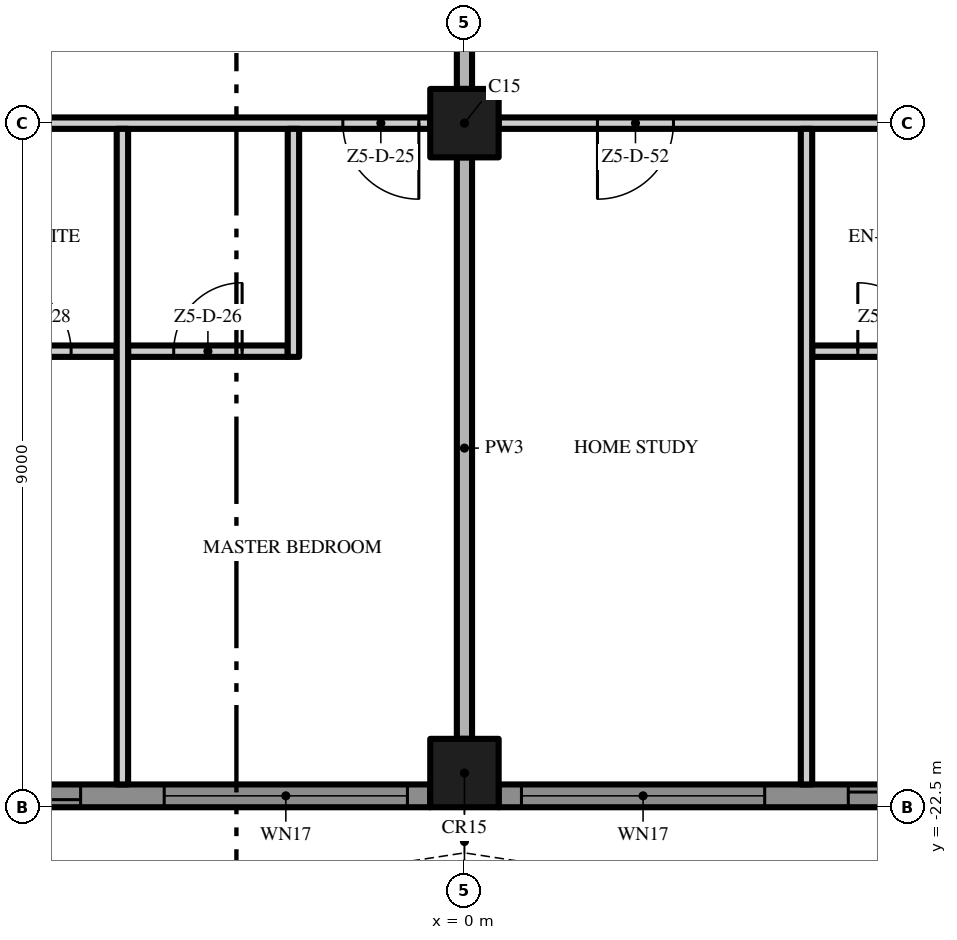
"""IFC4 building model, lengths in metres.
Left out: names, types, materials, properties, quantities, classifications, styles, units other than length and angle.
Written with IfcOpenShell. Run it as: python <this file> out.ifc"""

import sys

from ifc_helpers import new_model, si_unit, direction, frame, frame_2d, origin, origin_2d, place, context, subcontext, project, spatial, polyline, rectangle, outline, extrude, element, fill, save


model = new_model("IFC4")
c1 = context("Model", 3, precision=1e-05, world=origin(), true_north=direction((0.0, 1.0)))
c2 = subcontext(c1, "Body", "Model", "MODEL_VIEW")
j1 = project(units=[si_unit("LENGTHUNIT", "METRE"), si_unit("PLANEANGLEUNIT", "RADIAN")], contexts=[c1])
p1 = place(None, origin())
s1 = spatial("IfcSite", under=j1, at=p1, CompositionType="ELEMENT")
p2 = place(p1, origin())
s2 = spatial("IfcBuilding", under=s1, at=p2, CompositionType="ELEMENT")
p3 = place(p2, frame((0.0, 0.0, 280.6)))
s3 = spatial("IfcBuildingStorey", under=s2, at=p3, CompositionType="ELEMENT", Elevation=280.6)
for number, where, z_axis, x_axis in (
    (1, (0.0, -13.5, 0.0), (0.0, 0.0, 1.0), (1.0, 0.0, 0.0)),
    (2, (0.0, -22.05, 0.0), (0.0, 0.0, 1.0), (1.0, 0.0, 0.0)),
):
    element("IfcColumn", number, at=place(p3, frame(where, z_axis=z_axis, x_axis=x_axis)), inside=s3, PredefinedType="COLUMN", context=c2, shape_type="SweptSolid", body=[
        extrude(rectangle(XDim=0.9, YDim=0.9, at=origin_2d()), origin(), (0.0, 0.0, 1.0), 3.5),
    ])
p4 = place(p3, frame((-0.45, -22.35, 0.0), z_axis=(0.0, 0.0, 1.0), x_axis=(-1.0, 0.0, 0.0)))
e3 = element("IfcWall", 3, at=p4, inside=s3, PredefinedType="SOLIDWALL", context=c2, shape_type="SweptSolid", body=[
    extrude(rectangle(XDim=8.1, YDim=0.3, at=frame_2d((4.05, 0.0))), origin(), (0.0, 0.0, 1.0), 3.5),
])
p5 = place(p4, frame((4.6, 0.0, 0.0)))
e4 = element("IfcOpeningElement", 4, at=p5, cuts=e3, PredefinedType="OPENING", context=c2, shape_type="SweptSolid", body=[
    extrude(rectangle(XDim=3.2, YDim=2.4, at=frame_2d((1.6, 1.2))), frame((0.0, 0.16, 0.0), z_axis=(0.0, -1.0, 0.0), x_axis=(1.0, 0.0, 0.0)), (0.0, 0.0, 1.0), 0.32),
])
p6 = place(p4, frame((0.3, 0.0, 0.45)))
e5 = element("IfcOpeningElement", 5, at=p6, cuts=e3, PredefinedType="OPENING", context=c2, shape_type="SweptSolid", body=[
    extrude(rectangle(XDim=3.2, YDim=2.65, at=frame_2d((1.6, 1.325))), frame((0.0, 0.16, 0.0), z_axis=(0.0, -1.0, 0.0), x_axis=(1.0, 0.0, 0.0)), (0.0, 0.0, 1.0), 0.32),
])
p7 = place(p3, frame((8.55, -22.35, 0.0), z_axis=(0.0, 0.0, 1.0), x_axis=(-1.0, 0.0, 0.0)))
e6 = element("IfcWall", 6, at=p7, inside=s3, PredefinedType="SOLIDWALL", context=c2, shape_type="SweptSolid", body=[
    extrude(rectangle(XDim=8.1, YDim=0.3, at=frame_2d((4.05, 0.0))), origin(), (0.0, 0.0, 1.0), 3.5),
])
p8 = place(p7, frame((4.6, 0.0, 0.45)))
e7 = element("IfcOpeningElement", 7, at=p8, cuts=e6, PredefinedType="OPENING", context=c2, shape_type="SweptSolid", body=[
    extrude(rectangle(XDim=3.2, YDim=2.65, at=frame_2d((1.6, 1.325))), frame((0.0, 0.16, 0.0), z_axis=(0.0, -1.0, 0.0), x_axis=(1.0, 0.0, 0.0)), (0.0, 0.0, 1.0), 0.32),
])
p9 = place(p7, frame((0.3, 0.0, 0.0)))
e8 = element("IfcOpeningElement", 8, at=p9, cuts=e6, PredefinedType="OPENING", context=c2, shape_type="SweptSolid", body=[
    extrude(rectangle(XDim=3.2, YDim=2.4, at=frame_2d((1.6, 1.2))), frame((0.0, 0.16, 0.0), z_axis=(0.0, -1.0, 0.0), x_axis=(1.0, 0.0, 0.0)), (0.0, 0.0, 1.0), 0.32),
])
p10 = place(p3, origin())
e9 = element("IfcWall", 9, at=p10, inside=s3, PredefinedType="USERDEFINED", context=c2, shape_type="SweptSolid", body=[
    extrude(outline(polyline([(-22.5, -25.5), (-21.0, -25.271), (-19.5, -24.671), (-18.0, -23.929), (-16.5, -23.329), (-15.0, -23.1), (-13.5, -23.329), (-12.0, -23.929), (-10.5, -24.671), (-9.0, -25.271), (-7.5, -25.5), (-6.0, -25.271), (-4.5, -24.671), (-3.0, -23.929), (-1.5, -23.329), (0.0, -23.1), (1.5, -23.329), (3.0, -23.929), (4.5, -24.671), (6.0, -25.271), (7.5, -25.5), (9.0, -25.271), (10.5, -24.671), (12.0, -23.929), (13.5, -23.329), (15.0, -23.1), (16.5, -23.329), (18.0, -23.929), (19.5, -24.671), (21.0, -25.271), (22.5, -25.5), (22.538, -25.253), (21.066, -25.028), (19.602, -24.442), (18.102, -23.701), (16.566, -23.086), (15.0, -22.847), (13.434, -23.086), (11.898, -23.701), (10.398, -24.442), (8.934, -25.028), (7.5, -25.247), (6.066, -25.028), (4.602, -24.442), (3.102, -23.701), (1.566, -23.086), (0.0, -22.847), (-1.566, -23.086), (-3.102, -23.701), (-4.602, -24.442), (-6.066, -25.028), (-7.5, -25.247), (-8.934, -25.028), (-10.398, -24.442), (-11.898, -23.701), (-13.434, -23.086), (-15.0, -22.847), (-16.566, -23.086), (-18.102, -23.701), (-19.602, -24.442), (-21.066, -25.028), (-22.538, -25.253), (-22.5, -25.5)])), origin(), (0.0, 0.0, 1.0), 0.9),
])
p11 = place(p3, frame((-6.675, -16.5, 0.0), z_axis=(0.0, 0.0, 1.0), x_axis=(1.0, 0.0, 0.0)))
e10 = element("IfcWall", 10, at=p11, inside=s3, PredefinedType="PARTITIONING", context=c2, shape_type="SweptSolid", body=[
    extrude(rectangle(XDim=2.1, YDim=0.15, at=frame_2d((1.05, 0.0))), origin(), (0.0, 0.0, 1.0), 3.5),
])
p12 = place(p11, frame((0.6, 0.0, 0.0)))
e11 = element("IfcOpeningElement", 11, at=p12, cuts=e10, PredefinedType="OPENING", context=c2, shape_type="SweptSolid", body=[
    extrude(rectangle(XDim=0.9, YDim=2.1, at=frame_2d((0.45, 1.05))), frame((0.0, 0.085, 0.0), z_axis=(0.0, -1.0, 0.0), x_axis=(1.0, 0.0, 0.0)), (0.0, 0.0, 1.0), 0.17),
])
p13 = place(p3, frame((-4.425, -16.5, 0.0), z_axis=(0.0, 0.0, 1.0), x_axis=(1.0, 0.0, 0.0)))
e12 = element("IfcWall", 12, at=p13, inside=s3, PredefinedType="PARTITIONING", context=c2, shape_type="SweptSolid", body=[
    extrude(rectangle(XDim=2.1, YDim=0.15, at=frame_2d((1.05, 0.0))), origin(), (0.0, 0.0, 1.0), 3.5),
])
p14 = place(p13, frame((0.6, 0.0, 0.0)))
e13 = element("IfcOpeningElement", 13, at=p14, cuts=e12, PredefinedType="OPENING", context=c2, shape_type="SweptSolid", body=[
    extrude(rectangle(XDim=0.9, YDim=2.1, at=frame_2d((0.45, 1.05))), frame((0.0, 0.085, 0.0), z_axis=(0.0, -1.0, 0.0), x_axis=(1.0, 0.0, 0.0)), (0.0, 0.0, 1.0), 0.17),
])
p15 = place(p3, frame((4.575, -16.5, 0.0), z_axis=(0.0, 0.0, 1.0), x_axis=(1.0, 0.0, 0.0)))
e14 = element("IfcWall", 14, at=p15, inside=s3, PredefinedType="PARTITIONING", context=c2, shape_type="SweptSolid", body=[
    extrude(rectangle(XDim=2.1, YDim=0.15, at=frame_2d((1.05, 0.0))), origin(), (0.0, 0.0, 1.0), 3.5),
])
p16 = place(p15, frame((0.6, 0.0, 0.0)))
e15 = element("IfcOpeningElement", 15, at=p16, cuts=e14, PredefinedType="OPENING", context=c2, shape_type="SweptSolid", body=[
    extrude(rectangle(XDim=0.9, YDim=2.1, at=frame_2d((0.45, 1.05))), frame((0.0, 0.085, 0.0), z_axis=(0.0, -1.0, 0.0), x_axis=(1.0, 0.0, 0.0)), (0.0, 0.0, 1.0), 0.17),
])
p17 = place(p3, frame((-0.45, -13.5, 0.0), z_axis=(0.0, 0.0, 1.0), x_axis=(-1.0, 0.0, 0.0)))
e16 = element("IfcWall", 16, at=p17, inside=s3, PredefinedType="PARTITIONING", context=c2, shape_type="SweptSolid", body=[
    extrude(rectangle(XDim=8.1, YDim=0.15, at=frame_2d((4.05, 0.0))), origin(), (0.0, 0.0, 1.0), 3.5),
])
p18 = place(p17, frame((0.15, 0.0, 0.0)))
e17 = element("IfcOpeningElement", 17, at=p18, cuts=e16, PredefinedType="OPENING", context=c2, shape_type="SweptSolid", body=[
    extrude(rectangle(XDim=1.0, YDim=2.4, at=frame_2d((0.5, 1.2))), frame((0.0, 0.085, 0.0), z_axis=(0.0, -1.0, 0.0), x_axis=(1.0, 0.0, 0.0)), (0.0, 0.0, 1.0), 0.17),
])
p19 = place(p17, frame((6.9, 0.0, 0.0)))
e18 = element("IfcOpeningElement", 18, at=p19, cuts=e16, PredefinedType="OPENING", context=c2, shape_type="SweptSolid", body=[
    extrude(rectangle(XDim=1.0, YDim=2.4, at=frame_2d((0.5, 1.2))), frame((0.0, 0.085, 0.0), z_axis=(0.0, -1.0, 0.0), x_axis=(1.0, 0.0, 0.0)), (0.0, 0.0, 1.0), 0.17),
])
p20 = place(p3, frame((8.55, -13.5, 0.0), z_axis=(0.0, 0.0, 1.0), x_axis=(-1.0, 0.0, 0.0)))
e19 = element("IfcWall", 19, at=p20, inside=s3, PredefinedType="PARTITIONING", context=c2, shape_type="SweptSolid", body=[
    extrude(rectangle(XDim=8.1, YDim=0.15, at=frame_2d((4.05, 0.0))), origin(), (0.0, 0.0, 1.0), 3.5),
])
p21 = place(p20, frame((0.2, 0.0, 0.0)))
e20 = element("IfcOpeningElement", 20, at=p21, cuts=e19, PredefinedType="OPENING", context=c2, shape_type="SweptSolid", body=[
    extrude(rectangle(XDim=1.0, YDim=2.4, at=frame_2d((0.5, 1.2))), frame((0.0, 0.085, 0.0), z_axis=(0.0, -1.0, 0.0), x_axis=(1.0, 0.0, 0.0)), (0.0, 0.0, 1.0), 0.17),
])
p22 = place(p20, frame((5.8, 0.0, 0.0)))
e21 = element("IfcOpeningElement", 21, at=p22, cuts=e19, PredefinedType="OPENING", context=c2, shape_type="SweptSolid", body=[
    extrude(rectangle(XDim=1.0, YDim=2.4, at=frame_2d((0.5, 1.2))), frame((0.0, 0.085, 0.0), z_axis=(0.0, -1.0, 0.0), x_axis=(1.0, 0.0, 0.0)), (0.0, 0.0, 1.0), 0.17),
])
p23 = place(p3, frame((-4.5, -22.2, 0.0), z_axis=(0.0, 0.0, 1.0), x_axis=(0.0, 1.0, 0.0)))
e22 = element("IfcWall", 22, at=p23, inside=s3, PredefinedType="PARTITIONING", context=c2, shape_type="SweptSolid", body=[
    extrude(rectangle(XDim=8.625, YDim=0.15, at=frame_2d((4.312, 0.0))), origin(), (0.0, 0.0, 1.0), 3.5),
])
p24 = place(p3, frame((-2.25, -16.575, 0.0), z_axis=(0.0, 0.0, 1.0), x_axis=(0.0, 1.0, 0.0)))
e23 = element("IfcWall", 23, at=p24, inside=s3, PredefinedType="PARTITIONING", context=c2, shape_type="SweptSolid", body=[
    extrude(rectangle(XDim=3.0, YDim=0.15, at=frame_2d((1.5, 0.0))), origin(), (0.0, 0.0, 1.0), 3.5),
])
p25 = place(p3, frame((0.0, -21.6, 0.0), z_axis=(0.0, 0.0, 1.0), x_axis=(0.0, 1.0, 0.0)))
e24 = element("IfcWall", 24, at=p25, inside=s3, PredefinedType="PARTITIONING", context=c2, shape_type="SweptSolid", body=[
    extrude(rectangle(XDim=7.65, YDim=0.2, at=frame_2d((3.825, 0.0))), origin(), (0.0, 0.0, 1.0), 3.5),
])
p26 = place(p3, frame((0.0, -13.05, 0.0), z_axis=(0.0, 0.0, 1.0), x_axis=(0.0, 1.0, 0.0)))
e25 = element("IfcWall", 25, at=p26, inside=s3, PredefinedType="PARTITIONING", context=c2, shape_type="SweptSolid", body=[
    extrude(rectangle(XDim=8.1, YDim=0.2, at=frame_2d((4.05, 0.0))), origin(), (0.0, 0.0, 1.0), 3.5),
])
p27 = place(p3, frame((4.5, -22.2, 0.0), z_axis=(0.0, 0.0, 1.0), x_axis=(0.0, 1.0, 0.0)))
e26 = element("IfcWall", 26, at=p27, inside=s3, PredefinedType="PARTITIONING", context=c2, shape_type="SweptSolid", body=[
    extrude(rectangle(XDim=8.625, YDim=0.15, at=frame_2d((4.312, 0.0))), origin(), (0.0, 0.0, 1.0), 3.5),
])
p28 = place(p5, origin())
e27 = element("IfcDoor", 27, at=p28, inside=s3, OperationType="SINGLE_SWING_LEFT", PredefinedType="DOOR", context=c2, shape_type="SweptSolid", body=[
    extrude(rectangle(XDim=3.2, YDim=2.4, at=frame_2d((1.6, 1.2))), frame((0.0, 0.025, 0.0), z_axis=(0.0, -1.0, 0.0), x_axis=(1.0, 0.0, 0.0)), (0.0, 0.0, 1.0), 0.05),
])
fill(e4, e27)
p29 = place(p6, origin())
e28 = element("IfcWindow", 28, at=p29, inside=s3, PartitioningType="SINGLE_PANEL", PredefinedType="WINDOW", context=c2, shape_type="SweptSolid", body=[
    extrude(rectangle(XDim=3.2, YDim=2.65, at=frame_2d((1.6, 1.325))), frame((0.0, 0.03, 0.0), z_axis=(0.0, -1.0, 0.0), x_axis=(1.0, 0.0, 0.0)), (0.0, 0.0, 1.0), 0.06),
])
fill(e5, e28)
p30 = place(p8, origin())
e29 = element("IfcWindow", 29, at=p30, inside=s3, PartitioningType="SINGLE_PANEL", PredefinedType="WINDOW", context=c2, shape_type="SweptSolid", body=[
    extrude(rectangle(XDim=3.2, YDim=2.65, at=frame_2d((1.6, 1.325))), frame((0.0, 0.03, 0.0), z_axis=(0.0, -1.0, 0.0), x_axis=(1.0, 0.0, 0.0)), (0.0, 0.0, 1.0), 0.06),
])
fill(e7, e29)
p31 = place(p9, origin())
e30 = element("IfcDoor", 30, at=p31, inside=s3, OperationType="SINGLE_SWING_LEFT", PredefinedType="DOOR", context=c2, shape_type="SweptSolid", body=[
    extrude(rectangle(XDim=3.2, YDim=2.4, at=frame_2d((1.6, 1.2))), frame((0.0, 0.025, 0.0), z_axis=(0.0, -1.0, 0.0), x_axis=(1.0, 0.0, 0.0)), (0.0, 0.0, 1.0), 0.05),
])
fill(e8, e30)
p32 = place(p18, origin())
e31 = element("IfcDoor", 31, at=p32, inside=s3, OperationType="SINGLE_SWING_LEFT", PredefinedType="DOOR", context=c2, shape_type="SweptSolid", body=[
    extrude(rectangle(XDim=1.0, YDim=2.4, at=frame_2d((0.5, 1.2))), frame((0.0, 0.025, 0.0), z_axis=(0.0, -1.0, 0.0), x_axis=(1.0, 0.0, 0.0)), (0.0, 0.0, 1.0), 0.05),
])
fill(e17, e31)
p33 = place(p14, origin())
e32 = element("IfcDoor", 32, at=p33, inside=s3, OperationType="SINGLE_SWING_RIGHT", PredefinedType="DOOR", context=c2, shape_type="SweptSolid", body=[
    extrude(rectangle(XDim=0.9, YDim=2.1, at=frame_2d((0.45, 1.05))), frame((0.0, 0.025, 0.0), z_axis=(0.0, -1.0, 0.0), x_axis=(1.0, 0.0, 0.0)), (0.0, 0.0, 1.0), 0.05),
])
fill(e13, e32)
p34 = place(p12, origin())
e33 = element("IfcDoor", 33, at=p34, inside=s3, OperationType="SINGLE_SWING_LEFT", PredefinedType="DOOR", context=c2, shape_type="SweptSolid", body=[
    extrude(rectangle(XDim=0.9, YDim=2.1, at=frame_2d((0.45, 1.05))), frame((0.0, 0.025, 0.0), z_axis=(0.0, -1.0, 0.0), x_axis=(1.0, 0.0, 0.0)), (0.0, 0.0, 1.0), 0.05),
])
fill(e11, e33)
p35 = place(p16, origin())
e34 = element("IfcDoor", 34, at=p35, inside=s3, OperationType="SINGLE_SWING_LEFT", PredefinedType="DOOR", context=c2, shape_type="SweptSolid", body=[
    extrude(rectangle(XDim=0.9, YDim=2.1, at=frame_2d((0.45, 1.05))), frame((0.0, 0.025, 0.0), z_axis=(0.0, -1.0, 0.0), x_axis=(1.0, 0.0, 0.0)), (0.0, 0.0, 1.0), 0.05),
])
fill(e15, e34)
p36 = place(p22, origin())
e35 = element("IfcDoor", 35, at=p36, inside=s3, OperationType="SINGLE_SWING_RIGHT", PredefinedType="DOOR", context=c2, shape_type="SweptSolid", body=[
    extrude(rectangle(XDim=1.0, YDim=2.4, at=frame_2d((0.5, 1.2))), frame((0.0, 0.025, 0.0), z_axis=(0.0, -1.0, 0.0), x_axis=(1.0, 0.0, 0.0)), (0.0, 0.0, 1.0), 0.05),
])
fill(e21, e35)
save(model, sys.argv[1])
